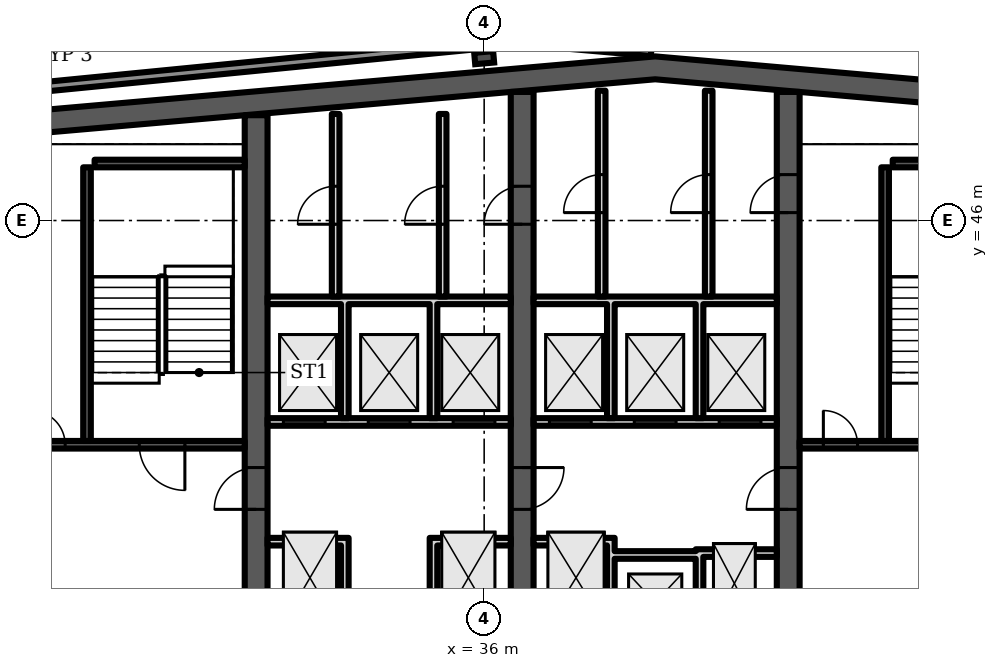
"""IFC4 building model, lengths in metres.
Left out: names, types, materials, properties, quantities, classifications, styles, units other than length and angle.
Written with IfcOpenShell. Run it as: python <this file> out.ifc"""

import sys

from ifc_helpers import new_model, si_unit, direction, frame, frame_2d, origin, origin_2d, place, context, subcontext, project, spatial, polyline, rectangle, i_section, outline, extrude, element, fill, save


model = new_model("IFC4")
c1 = context("Model", 3, precision=1e-05, world=origin(), true_north=direction((0.0, 1.0)))
c2 = subcontext(c1, "Body", "Model", "MODEL_VIEW")
j1 = project(units=[si_unit("LENGTHUNIT", "METRE"), si_unit("PLANEANGLEUNIT", "RADIAN")], contexts=[c1])
p1 = place(None, origin())
s1 = spatial("IfcSite", under=j1, at=p1, CompositionType="ELEMENT")
p2 = place(p1, origin())
s2 = spatial("IfcBuilding", under=s1, at=p2, CompositionType="ELEMENT")
p3 = place(p2, frame((0.0, 0.0, 207.1)))
s3 = spatial("IfcBuildingStorey", under=s2, at=p3, CompositionType="ELEMENT", Elevation=207.1)
p4 = place(p3, frame((0.0, 0.0, -0.0)))
e1 = element("IfcWall", 1, at=p4, inside=s3, PredefinedType="SHEAR", context=c2, shape_type="SweptSolid", body=[
    extrude(outline(polyline([(23.0, 48.185), (40.5, 49.716), (58.0, 48.185), (58.0, 48.787), (40.5, 50.318), (23.0, 48.787), (23.0, 48.185)])), origin(), (0.0, 0.0, 1.0), 3.6),
])
p5 = place(p3, frame((30.0, 34.6, 0.0), z_axis=(0.0, 0.0, 1.0), x_axis=(0.0, 1.0, 0.0)))
e2 = element("IfcWall", 2, at=p5, inside=s3, PredefinedType="SHEAR", context=c2, shape_type="SweptSolid", body=[
    extrude(rectangle(XDim=14.171, YDim=0.6, at=frame_2d((7.085, 0.0))), origin(), (0.0, 0.0, 1.0), 3.6),
])
p6 = place(p5, frame((3.8, 0.0, 0.0)))
e3 = element("IfcOpeningElement", 3, at=p6, cuts=e2, PredefinedType="OPENING", context=c2, shape_type="SweptSolid", body=[
    extrude(rectangle(XDim=1.1, YDim=2.1, at=frame_2d((0.55, 1.05))), frame((0.0, 0.31, 0.0), z_axis=(0.0, -1.0, 0.0), x_axis=(1.0, 0.0, 0.0)), (0.0, 0.0, 1.0), 0.62),
])
p7 = place(p3, frame((37.0, 34.6, 0.0), z_axis=(0.0, 0.0, 1.0), x_axis=(0.0, 1.0, 0.0)))
e4 = element("IfcWall", 4, at=p7, inside=s3, PredefinedType="SHEAR", context=c2, shape_type="SweptSolid", body=[
    extrude(rectangle(XDim=14.784, YDim=0.6, at=frame_2d((7.392, 0.0))), origin(), (0.0, 0.0, 1.0), 3.6),
])
p8 = place(p7, frame((11.302, 0.0, 0.0)))
e5 = element("IfcOpeningElement", 5, at=p8, cuts=e4, PredefinedType="OPENING", context=c2, shape_type="SweptSolid", body=[
    extrude(rectangle(XDim=1.0, YDim=2.1, at=frame_2d((0.5, 1.05))), frame((0.0, 0.31, 0.0), z_axis=(0.0, -1.0, 0.0), x_axis=(1.0, 0.0, 0.0)), (0.0, 0.0, 1.0), 0.62),
])
p9 = place(p7, frame((3.8, 0.0, 0.0)))
e6 = element("IfcOpeningElement", 6, at=p9, cuts=e4, PredefinedType="OPENING", context=c2, shape_type="SweptSolid", body=[
    extrude(rectangle(XDim=1.1, YDim=2.1, at=frame_2d((0.55, 1.05))), frame((0.0, 0.31, 0.0), z_axis=(0.0, -1.0, 0.0), x_axis=(1.0, 0.0, 0.0)), (0.0, 0.0, 1.0), 0.62),
])
p10 = place(p3, frame((44.0, 34.6, 0.0), z_axis=(0.0, 0.0, 1.0), x_axis=(0.0, 1.0, 0.0)))
e7 = element("IfcWall", 7, at=p10, inside=s3, PredefinedType="SHEAR", context=c2, shape_type="SweptSolid", body=[
    extrude(rectangle(XDim=14.784, YDim=0.6, at=frame_2d((7.392, 0.0))), origin(), (0.0, 0.0, 1.0), 3.6),
])
p11 = place(p10, frame((11.608, 0.0, 0.0)))
e8 = element("IfcOpeningElement", 8, at=p11, cuts=e7, PredefinedType="OPENING", context=c2, shape_type="SweptSolid", body=[
    extrude(rectangle(XDim=1.0, YDim=2.1, at=frame_2d((0.5, 1.05))), frame((0.0, 0.31, 0.0), z_axis=(0.0, -1.0, 0.0), x_axis=(1.0, 0.0, 0.0)), (0.0, 0.0, 1.0), 0.62),
])
p12 = place(p10, frame((3.8, 0.0, 0.0)))
e9 = element("IfcOpeningElement", 9, at=p12, cuts=e7, PredefinedType="OPENING", context=c2, shape_type="SweptSolid", body=[
    extrude(rectangle(XDim=1.1, YDim=2.1, at=frame_2d((0.55, 1.05))), frame((0.0, 0.31, 0.0), z_axis=(0.0, -1.0, 0.0), x_axis=(1.0, 0.0, 0.0)), (0.0, 0.0, 1.0), 0.62),
])
p13 = place(p3, frame((36.0, 50.285, 0.0), z_axis=(0.0, 0.0, 1.0), x_axis=(-0.087156, 0.996197, 0.0)))
e10 = element("IfcColumn", 10, at=p13, inside=s3, PredefinedType="COLUMN", context=c2, shape_type="SweptSolid", body=[
    extrude(i_section(OverallWidth=0.3, OverallDepth=0.5, WebThickness=0.014, FlangeThickness=0.028, FilletRadius=0.027, at=origin_2d()), origin(), (0.0, 0.0, 1.0), 3.6),
])
p14 = place(p3, frame((13.135, 48.413, 0.0), z_axis=(0.0, 0.0, 1.0), x_axis=(0.995233, 0.097487, 0.0)))
e11 = element("IfcWall", 11, at=p14, inside=s3, PredefinedType="PARAPET", context=c2, shape_type="SweptSolid", body=[
    extrude(rectangle(XDim=23.979, YDim=0.25, at=frame_2d((11.99, 0.0))), origin(), (0.0, 0.0, 1.0), 1.1),
])
p15 = place(p3, frame((37.03, 50.748, 0.0), z_axis=(0.0, 0.0, 1.0), x_axis=(0.996193, -0.087128, 0.0)))
e12 = element("IfcWall", 12, at=p15, inside=s3, PredefinedType="PARAPET", context=c2, shape_type="SweptSolid", body=[
    extrude(rectangle(XDim=3.379, YDim=0.25, at=frame_2d((1.69, 0.0))), origin(), (0.0, 0.0, 1.0), 1.1),
])
p16 = place(p3, frame((23.6, 40.1, 0.0), z_axis=(0.0, 0.0, 1.0), x_axis=(1.0, 0.0, 0.0)))
e13 = element("IfcWall", 13, at=p16, inside=s3, PredefinedType="SHEAR", context=c2, shape_type="SweptSolid", body=[
    extrude(rectangle(XDim=6.1, YDim=0.2, at=frame_2d((3.05, 0.0))), origin(), (0.0, 0.0, 1.0), 3.2),
])
p17 = place(p16, frame((3.325, 0.0, 0.0)))
e14 = element("IfcOpeningElement", 14, at=p17, cuts=e13, PredefinedType="OPENING", context=c2, shape_type="SweptSolid", body=[
    extrude(rectangle(XDim=1.2, YDim=2.1, at=frame_2d((0.6, 1.05))), frame((0.0, 0.11, 0.0), z_axis=(0.0, -1.0, 0.0), x_axis=(1.0, 0.0, 0.0)), (0.0, 0.0, 1.0), 0.22),
])
p18 = place(p16, frame((0.475, 0.0, 0.0)))
e15 = element("IfcOpeningElement", 15, at=p18, cuts=e13, PredefinedType="OPENING", context=c2, shape_type="SweptSolid", body=[
    extrude(rectangle(XDim=0.9, YDim=2.1, at=frame_2d((0.45, 1.05))), frame((0.0, 0.11, 0.0), z_axis=(0.0, -1.0, 0.0), x_axis=(1.0, 0.0, 0.0)), (0.0, 0.0, 1.0), 0.22),
])
p19 = place(p3, frame((25.55, 40.2, 0.0), z_axis=(0.0, 0.0, 1.0), x_axis=(0.0, 1.0, 0.0)))
e16 = element("IfcWall", 16, at=p19, inside=s3, PredefinedType="SHEAR", context=c2, shape_type="SweptSolid", body=[
    extrude(rectangle(XDim=7.2, YDim=0.2, at=frame_2d((3.6, 0.0))), origin(), (0.0, 0.0, 1.0), 3.2),
])
p20 = place(p3, frame((25.75, 47.5, 0.0), z_axis=(0.0, 0.0, 1.0), x_axis=(1.0, 0.0, 0.0)))
e17 = element("IfcWall", 17, at=p20, inside=s3, PredefinedType="SHEAR", context=c2, shape_type="SweptSolid", body=[
    extrude(rectangle(XDim=3.95, YDim=0.2, at=frame_2d((1.975, 0.0))), origin(), (0.0, 0.0, 1.0), 3.2),
])
p21 = place(p3, frame((30.3, 40.7, 0.0), z_axis=(0.0, 0.0, 1.0), x_axis=(1.0, 0.0, 0.0)))
e18 = element("IfcWall", 18, at=p21, inside=s3, PredefinedType="PARTITIONING", context=c2, shape_type="SweptSolid", body=[
    extrude(rectangle(XDim=6.4, YDim=0.2, at=frame_2d((3.2, 0.0))), origin(), (0.0, 0.0, 1.0), 3.2),
])
p22 = place(p21, frame((0.417, 0.0, 0.0)))
e19 = element("IfcOpeningElement", 19, at=p22, cuts=e18, PredefinedType="OPENING", context=c2, shape_type="SweptSolid", body=[
    extrude(rectangle(XDim=1.1, YDim=2.1, at=frame_2d((0.55, 1.05))), frame((0.0, 0.11, 0.0), z_axis=(0.0, -1.0, 0.0), x_axis=(1.0, 0.0, 0.0)), (0.0, 0.0, 1.0), 0.22),
])
p23 = place(p21, frame((2.65, 0.0, 0.0)))
e20 = element("IfcOpeningElement", 20, at=p23, cuts=e18, PredefinedType="OPENING", context=c2, shape_type="SweptSolid", body=[
    extrude(rectangle(XDim=1.1, YDim=2.1, at=frame_2d((0.55, 1.05))), frame((0.0, 0.11, 0.0), z_axis=(0.0, -1.0, 0.0), x_axis=(1.0, 0.0, 0.0)), (0.0, 0.0, 1.0), 0.22),
])
p24 = place(p21, frame((4.883, 0.0, 0.0)))
e21 = element("IfcOpeningElement", 21, at=p24, cuts=e18, PredefinedType="OPENING", context=c2, shape_type="SweptSolid", body=[
    extrude(rectangle(XDim=1.1, YDim=2.1, at=frame_2d((0.55, 1.05))), frame((0.0, 0.11, 0.0), z_axis=(0.0, -1.0, 0.0), x_axis=(1.0, 0.0, 0.0)), (0.0, 0.0, 1.0), 0.22),
])
p25 = place(p3, frame((0.0, 0.0, -0.0)))
e22 = element("IfcWall", 22, at=p25, inside=s3, PredefinedType="PARTITIONING", context=c2, shape_type="SweptSolid", body=[
    extrude(outline(polyline([(32.233, 37.45), (30.3, 37.45), (30.3, 37.65), (32.233, 37.65), (32.433, 37.65), (32.433, 34.6), (32.233, 34.6), (32.233, 37.45)])), origin(), (0.0, 0.0, 1.0), 3.2),
])
p26 = place(p3, frame((0.0, 0.0, -0.0)))
e23 = element("IfcWall", 23, at=p26, inside=s3, PredefinedType="PARTITIONING", context=c2, shape_type="SweptSolid", body=[
    extrude(outline(polyline([(34.567, 37.65), (34.767, 37.65), (36.7, 37.65), (36.7, 37.45), (34.767, 37.45), (34.767, 34.6), (34.567, 34.6), (34.567, 37.65)])), origin(), (0.0, 0.0, 1.0), 3.2),
])
p27 = place(p3, frame((0.0, 0.0, -0.0)))
e24 = element("IfcWall", 24, at=p27, inside=s3, PredefinedType="PARTITIONING", context=c2, shape_type="SweptSolid", body=[
    extrude(outline(polyline([(32.433, 40.8), (32.233, 40.8), (32.233, 43.8), (30.3, 43.8), (30.3, 44.0), (36.7, 44.0), (36.7, 43.8), (34.767, 43.8), (34.767, 40.8), (34.567, 40.8), (34.567, 43.8), (32.433, 43.8), (32.433, 40.8)])), origin(), (0.0, 0.0, 1.0), 3.2),
])
p28 = place(p3, frame((32.092, 44.0, 0.0), z_axis=(0.0, 0.0, 1.0), x_axis=(0.0, 1.0, 0.0)))
e25 = element("IfcWall", 25, at=p28, inside=s3, PredefinedType="PARTITIONING", context=c2, shape_type="SweptSolid", body=[
    extrude(rectangle(XDim=4.804, YDim=0.2, at=frame_2d((2.402, 0.0))), origin(), (0.0, 0.0, 1.0), 3.2),
])
p29 = place(p28, frame((1.902, 0.0, 0.0)))
e26 = element("IfcOpeningElement", 26, at=p29, cuts=e25, PredefinedType="OPENING", context=c2, shape_type="SweptSolid", body=[
    extrude(rectangle(XDim=1.0, YDim=2.1, at=frame_2d((0.5, 1.05))), frame((0.0, 0.11, 0.0), z_axis=(0.0, -1.0, 0.0), x_axis=(1.0, 0.0, 0.0)), (0.0, 0.0, 1.0), 0.22),
])
p30 = place(p3, frame((34.908, 44.0, 0.0), z_axis=(0.0, 0.0, 1.0), x_axis=(0.0, 1.0, 0.0)))
e27 = element("IfcWall", 27, at=p30, inside=s3, PredefinedType="PARTITIONING", context=c2, shape_type="SweptSolid", body=[
    extrude(rectangle(XDim=4.804, YDim=0.2, at=frame_2d((2.402, 0.0))), origin(), (0.0, 0.0, 1.0), 3.2),
])
p31 = place(p30, frame((1.902, 0.0, 0.0)))
e28 = element("IfcOpeningElement", 28, at=p31, cuts=e27, PredefinedType="OPENING", context=c2, shape_type="SweptSolid", body=[
    extrude(rectangle(XDim=1.0, YDim=2.1, at=frame_2d((0.5, 1.05))), frame((0.0, 0.11, 0.0), z_axis=(0.0, -1.0, 0.0), x_axis=(1.0, 0.0, 0.0)), (0.0, 0.0, 1.0), 0.22),
])
p32 = place(p3, frame((37.3, 40.7, 0.0), z_axis=(0.0, 0.0, 1.0), x_axis=(1.0, 0.0, 0.0)))
e29 = element("IfcWall", 29, at=p32, inside=s3, PredefinedType="PARTITIONING", context=c2, shape_type="SweptSolid", body=[
    extrude(rectangle(XDim=6.4, YDim=0.2, at=frame_2d((3.2, 0.0))), origin(), (0.0, 0.0, 1.0), 3.2),
])
p33 = place(p32, frame((0.417, 0.0, 0.0)))
e30 = element("IfcOpeningElement", 30, at=p33, cuts=e29, PredefinedType="OPENING", context=c2, shape_type="SweptSolid", body=[
    extrude(rectangle(XDim=1.1, YDim=2.1, at=frame_2d((0.55, 1.05))), frame((0.0, 0.11, 0.0), z_axis=(0.0, -1.0, 0.0), x_axis=(1.0, 0.0, 0.0)), (0.0, 0.0, 1.0), 0.22),
])
p34 = place(p32, frame((2.65, 0.0, 0.0)))
e31 = element("IfcOpeningElement", 31, at=p34, cuts=e29, PredefinedType="OPENING", context=c2, shape_type="SweptSolid", body=[
    extrude(rectangle(XDim=1.1, YDim=2.1, at=frame_2d((0.55, 1.05))), frame((0.0, 0.11, 0.0), z_axis=(0.0, -1.0, 0.0), x_axis=(1.0, 0.0, 0.0)), (0.0, 0.0, 1.0), 0.22),
])
p35 = place(p32, frame((4.883, 0.0, 0.0)))
e32 = element("IfcOpeningElement", 32, at=p35, cuts=e29, PredefinedType="OPENING", context=c2, shape_type="SweptSolid", body=[
    extrude(rectangle(XDim=1.1, YDim=2.1, at=frame_2d((0.55, 1.05))), frame((0.0, 0.11, 0.0), z_axis=(0.0, -1.0, 0.0), x_axis=(1.0, 0.0, 0.0)), (0.0, 0.0, 1.0), 0.22),
])
p36 = place(p3, frame((0.0, 0.0, -0.0)))
e33 = element("IfcWall", 33, at=p36, inside=s3, PredefinedType="PARTITIONING", context=c2, shape_type="SweptSolid", body=[
    extrude(outline(polyline([(41.567, 37.1), (39.433, 37.1), (39.433, 34.6), (39.233, 34.6), (39.233, 37.45), (37.3, 37.45), (37.3, 37.65), (39.233, 37.65), (39.433, 37.65), (39.433, 37.3), (41.567, 37.3), (41.567, 37.35), (41.767, 37.35), (43.7, 37.35), (43.7, 37.15), (41.767, 37.15), (41.767, 34.6), (41.567, 34.6), (41.567, 37.1)])), origin(), (0.0, 0.0, 1.0), 3.2),
])
p37 = place(p3, frame((0.0, 0.0, -0.0)))
e34 = element("IfcWall", 34, at=p37, inside=s3, PredefinedType="PARTITIONING", context=c2, shape_type="SweptSolid", body=[
    extrude(outline(polyline([(39.433, 40.8), (39.233, 40.8), (39.233, 43.8), (37.3, 43.8), (37.3, 44.0), (43.7, 44.0), (43.7, 43.8), (41.767, 43.8), (41.767, 40.8), (41.567, 40.8), (41.567, 43.8), (39.433, 43.8), (39.433, 40.8)])), origin(), (0.0, 0.0, 1.0), 3.2),
])
p38 = place(p3, frame((39.092, 44.0, 0.0), z_axis=(0.0, 0.0, 1.0), x_axis=(0.0, 1.0, 0.0)))
e35 = element("IfcWall", 35, at=p38, inside=s3, PredefinedType="PARTITIONING", context=c2, shape_type="SweptSolid", body=[
    extrude(rectangle(XDim=5.416, YDim=0.2, at=frame_2d((2.708, 0.0))), origin(), (0.0, 0.0, 1.0), 3.2),
])
p39 = place(p38, frame((2.208, 0.0, 0.0)))
e36 = element("IfcOpeningElement", 36, at=p39, cuts=e35, PredefinedType="OPENING", context=c2, shape_type="SweptSolid", body=[
    extrude(rectangle(XDim=1.0, YDim=2.1, at=frame_2d((0.5, 1.05))), frame((0.0, 0.11, 0.0), z_axis=(0.0, -1.0, 0.0), x_axis=(1.0, 0.0, 0.0)), (0.0, 0.0, 1.0), 0.22),
])
p40 = place(p3, frame((41.908, 44.0, 0.0), z_axis=(0.0, 0.0, 1.0), x_axis=(0.0, 1.0, 0.0)))
e37 = element("IfcWall", 37, at=p40, inside=s3, PredefinedType="PARTITIONING", context=c2, shape_type="SweptSolid", body=[
    extrude(rectangle(XDim=5.416, YDim=0.2, at=frame_2d((2.708, 0.0))), origin(), (0.0, 0.0, 1.0), 3.2),
])
p41 = place(p40, frame((2.208, 0.0, 0.0)))
e38 = element("IfcOpeningElement", 38, at=p41, cuts=e37, PredefinedType="OPENING", context=c2, shape_type="SweptSolid", body=[
    extrude(rectangle(XDim=1.0, YDim=2.1, at=frame_2d((0.5, 1.05))), frame((0.0, 0.11, 0.0), z_axis=(0.0, -1.0, 0.0), x_axis=(1.0, 0.0, 0.0)), (0.0, 0.0, 1.0), 0.22),
])
p42 = place(p3, frame((44.3, 40.1, 0.0), z_axis=(0.0, 0.0, 1.0), x_axis=(1.0, 0.0, 0.0)))
e39 = element("IfcWall", 39, at=p42, inside=s3, PredefinedType="SHEAR", context=c2, shape_type="SweptSolid", body=[
    extrude(rectangle(XDim=6.4, YDim=0.2, at=frame_2d((3.2, 0.0))), origin(), (0.0, 0.0, 1.0), 3.2),
])
p43 = place(p42, frame((3.625, 0.0, 0.0)))
e40 = element("IfcOpeningElement", 40, at=p43, cuts=e39, PredefinedType="OPENING", context=c2, shape_type="SweptSolid", body=[
    extrude(rectangle(XDim=1.2, YDim=2.1, at=frame_2d((0.6, 1.05))), frame((0.0, 0.11, 0.0), z_axis=(0.0, -1.0, 0.0), x_axis=(1.0, 0.0, 0.0)), (0.0, 0.0, 1.0), 0.22),
])
p44 = place(p42, frame((0.625, 0.0, 0.0)))
e41 = element("IfcOpeningElement", 41, at=p44, cuts=e39, PredefinedType="OPENING", context=c2, shape_type="SweptSolid", body=[
    extrude(rectangle(XDim=0.9, YDim=2.1, at=frame_2d((0.45, 1.05))), frame((0.0, 0.11, 0.0), z_axis=(0.0, -1.0, 0.0), x_axis=(1.0, 0.0, 0.0)), (0.0, 0.0, 1.0), 0.22),
])
p45 = place(p3, frame((46.55, 40.2, 0.0), z_axis=(0.0, 0.0, 1.0), x_axis=(0.0, 1.0, 0.0)))
e42 = element("IfcWall", 42, at=p45, inside=s3, PredefinedType="SHEAR", context=c2, shape_type="SweptSolid", body=[
    extrude(rectangle(XDim=7.2, YDim=0.2, at=frame_2d((3.6, 0.0))), origin(), (0.0, 0.0, 1.0), 3.2),
])
p46 = place(p3, frame((46.75, 47.5, 0.0), z_axis=(0.0, 0.0, 1.0), x_axis=(1.0, 0.0, 0.0)))
e43 = element("IfcWall", 43, at=p46, inside=s3, PredefinedType="SHEAR", context=c2, shape_type="SweptSolid", body=[
    extrude(rectangle(XDim=3.95, YDim=0.2, at=frame_2d((1.975, 0.0))), origin(), (0.0, 0.0, 1.0), 3.2),
])
p47 = place(p17, origin())
e44 = element("IfcDoor", 44, at=p47, inside=s3, OperationType="SINGLE_SWING_RIGHT", PredefinedType="DOOR", context=c2, shape_type="SweptSolid", body=[
    extrude(rectangle(XDim=1.2, YDim=2.1, at=frame_2d((0.6, 1.05))), frame((0.0, 0.025, 0.0), z_axis=(0.0, -1.0, 0.0), x_axis=(1.0, 0.0, 0.0)), (0.0, 0.0, 1.0), 0.05),
])
fill(e14, e44)
p48 = place(p18, origin())
e45 = element("IfcDoor", 45, at=p48, inside=s3, OperationType="SINGLE_SWING_LEFT", PredefinedType="DOOR", context=c2, shape_type="SweptSolid", body=[
    extrude(rectangle(XDim=0.9, YDim=2.1, at=frame_2d((0.45, 1.05))), frame((0.0, 0.025, 0.0), z_axis=(0.0, -1.0, 0.0), x_axis=(1.0, 0.0, 0.0)), (0.0, 0.0, 1.0), 0.05),
])
fill(e15, e45)
p49 = place(p22, origin())
e46 = element("IfcDoor", 46, at=p49, inside=s3, OperationType="DOUBLE_DOOR_SLIDING", PredefinedType="DOOR", context=c2, shape_type="SweptSolid", body=[
    extrude(rectangle(XDim=1.1, YDim=2.1, at=frame_2d((0.55, 1.05))), frame((0.0, 0.025, 0.0), z_axis=(0.0, -1.0, 0.0), x_axis=(1.0, 0.0, 0.0)), (0.0, 0.0, 1.0), 0.05),
])
fill(e19, e46)
p50 = place(p23, origin())
e47 = element("IfcDoor", 47, at=p50, inside=s3, OperationType="DOUBLE_DOOR_SLIDING", PredefinedType="DOOR", context=c2, shape_type="SweptSolid", body=[
    extrude(rectangle(XDim=1.1, YDim=2.1, at=frame_2d((0.55, 1.05))), frame((0.0, 0.025, 0.0), z_axis=(0.0, -1.0, 0.0), x_axis=(1.0, 0.0, 0.0)), (0.0, 0.0, 1.0), 0.05),
])
fill(e20, e47)
p51 = place(p24, origin())
e48 = element("IfcDoor", 48, at=p51, inside=s3, OperationType="DOUBLE_DOOR_SLIDING", PredefinedType="DOOR", context=c2, shape_type="SweptSolid", body=[
    extrude(rectangle(XDim=1.1, YDim=2.1, at=frame_2d((0.55, 1.05))), frame((0.0, 0.025, 0.0), z_axis=(0.0, -1.0, 0.0), x_axis=(1.0, 0.0, 0.0)), (0.0, 0.0, 1.0), 0.05),
])
fill(e21, e48)
p52 = place(p29, origin())
e49 = element("IfcDoor", 49, at=p52, inside=s3, OperationType="SINGLE_SWING_LEFT", PredefinedType="DOOR", context=c2, shape_type="SweptSolid", body=[
    extrude(rectangle(XDim=1.0, YDim=2.1, at=frame_2d((0.5, 1.05))), frame((0.0, 0.025, 0.0), z_axis=(0.0, -1.0, 0.0), x_axis=(1.0, 0.0, 0.0)), (0.0, 0.0, 1.0), 0.05),
])
fill(e26, e49)
p53 = place(p31, origin())
e50 = element("IfcDoor", 50, at=p53, inside=s3, OperationType="SINGLE_SWING_LEFT", PredefinedType="DOOR", context=c2, shape_type="SweptSolid", body=[
    extrude(rectangle(XDim=1.0, YDim=2.1, at=frame_2d((0.5, 1.05))), frame((0.0, 0.025, 0.0), z_axis=(0.0, -1.0, 0.0), x_axis=(1.0, 0.0, 0.0)), (0.0, 0.0, 1.0), 0.05),
])
fill(e28, e50)
p54 = place(p8, origin())
e51 = element("IfcDoor", 51, at=p54, inside=s3, OperationType="SINGLE_SWING_LEFT", PredefinedType="DOOR", context=c2, shape_type="SweptSolid", body=[
    extrude(rectangle(XDim=1.0, YDim=2.1, at=frame_2d((0.5, 1.05))), frame((0.0, 0.025, 0.0), z_axis=(0.0, -1.0, 0.0), x_axis=(1.0, 0.0, 0.0)), (0.0, 0.0, 1.0), 0.05),
])
fill(e5, e51)
p55 = place(p33, origin())
e52 = element("IfcDoor", 52, at=p55, inside=s3, OperationType="DOUBLE_DOOR_SLIDING", PredefinedType="DOOR", context=c2, shape_type="SweptSolid", body=[
    extrude(rectangle(XDim=1.1, YDim=2.1, at=frame_2d((0.55, 1.05))), frame((0.0, 0.025, 0.0), z_axis=(0.0, -1.0, 0.0), x_axis=(1.0, 0.0, 0.0)), (0.0, 0.0, 1.0), 0.05),
])
fill(e30, e52)
p56 = place(p34, origin())
e53 = element("IfcDoor", 53, at=p56, inside=s3, OperationType="DOUBLE_DOOR_SLIDING", PredefinedType="DOOR", context=c2, shape_type="SweptSolid", body=[
    extrude(rectangle(XDim=1.1, YDim=2.1, at=frame_2d((0.55, 1.05))), frame((0.0, 0.025, 0.0), z_axis=(0.0, -1.0, 0.0), x_axis=(1.0, 0.0, 0.0)), (0.0, 0.0, 1.0), 0.05),
])
fill(e31, e53)
p57 = place(p35, origin())
e54 = element("IfcDoor", 54, at=p57, inside=s3, OperationType="DOUBLE_DOOR_SLIDING", PredefinedType="DOOR", context=c2, shape_type="SweptSolid", body=[
    extrude(rectangle(XDim=1.1, YDim=2.1, at=frame_2d((0.55, 1.05))), frame((0.0, 0.025, 0.0), z_axis=(0.0, -1.0, 0.0), x_axis=(1.0, 0.0, 0.0)), (0.0, 0.0, 1.0), 0.05),
])
fill(e32, e54)
p58 = place(p39, origin())
e55 = element("IfcDoor", 55, at=p58, inside=s3, OperationType="SINGLE_SWING_LEFT", PredefinedType="DOOR", context=c2, shape_type="SweptSolid", body=[
    extrude(rectangle(XDim=1.0, YDim=2.1, at=frame_2d((0.5, 1.05))), frame((0.0, 0.025, 0.0), z_axis=(0.0, -1.0, 0.0), x_axis=(1.0, 0.0, 0.0)), (0.0, 0.0, 1.0), 0.05),
])
fill(e36, e55)
p59 = place(p41, origin())
e56 = element("IfcDoor", 56, at=p59, inside=s3, OperationType="SINGLE_SWING_LEFT", PredefinedType="DOOR", context=c2, shape_type="SweptSolid", body=[
    extrude(rectangle(XDim=1.0, YDim=2.1, at=frame_2d((0.5, 1.05))), frame((0.0, 0.025, 0.0), z_axis=(0.0, -1.0, 0.0), x_axis=(1.0, 0.0, 0.0)), (0.0, 0.0, 1.0), 0.05),
])
fill(e38, e56)
p60 = place(p11, origin())
e57 = element("IfcDoor", 57, at=p60, inside=s3, OperationType="SINGLE_SWING_LEFT", PredefinedType="DOOR", context=c2, shape_type="SweptSolid", body=[
    extrude(rectangle(XDim=1.0, YDim=2.1, at=frame_2d((0.5, 1.05))), frame((0.0, 0.025, 0.0), z_axis=(0.0, -1.0, 0.0), x_axis=(1.0, 0.0, 0.0)), (0.0, 0.0, 1.0), 0.05),
])
fill(e8, e57)
p61 = place(p44, origin())
e58 = element("IfcDoor", 58, at=p61, inside=s3, OperationType="SINGLE_SWING_LEFT", PredefinedType="DOOR", context=c2, shape_type="SweptSolid", body=[
    extrude(rectangle(XDim=0.9, YDim=2.1, at=frame_2d((0.45, 1.05))), frame((0.0, 0.025, 0.0), z_axis=(0.0, -1.0, 0.0), x_axis=(1.0, 0.0, 0.0)), (0.0, 0.0, 1.0), 0.05),
])
fill(e41, e58)
p62 = place(p6, origin())
e59 = element("IfcDoor", 59, at=p62, inside=s3, OperationType="SINGLE_SWING_LEFT", PredefinedType="DOOR", context=c2, shape_type="SweptSolid", body=[
    extrude(rectangle(XDim=1.1, YDim=2.1, at=frame_2d((0.55, 1.05))), frame((0.0, 0.025, 0.0), z_axis=(0.0, -1.0, 0.0), x_axis=(1.0, 0.0, 0.0)), (0.0, 0.0, 1.0), 0.05),
])
fill(e3, e59)
p63 = place(p9, origin())
e60 = element("IfcDoor", 60, at=p63, inside=s3, OperationType="SINGLE_SWING_RIGHT", PredefinedType="DOOR", context=c2, shape_type="SweptSolid", body=[
    extrude(rectangle(XDim=1.1, YDim=2.1, at=frame_2d((0.55, 1.05))), frame((0.0, 0.025, 0.0), z_axis=(0.0, -1.0, 0.0), x_axis=(1.0, 0.0, 0.0)), (0.0, 0.0, 1.0), 0.05),
])
fill(e6, e60)
p64 = place(p12, origin())
e61 = element("IfcDoor", 61, at=p64, inside=s3, OperationType="SINGLE_SWING_LEFT", PredefinedType="DOOR", context=c2, shape_type="SweptSolid", body=[
    extrude(rectangle(XDim=1.1, YDim=2.1, at=frame_2d((0.55, 1.05))), frame((0.0, 0.025, 0.0), z_axis=(0.0, -1.0, 0.0), x_axis=(1.0, 0.0, 0.0)), (0.0, 0.0, 1.0), 0.05),
])
fill(e9, e61)
save(model, sys.argv[1])
